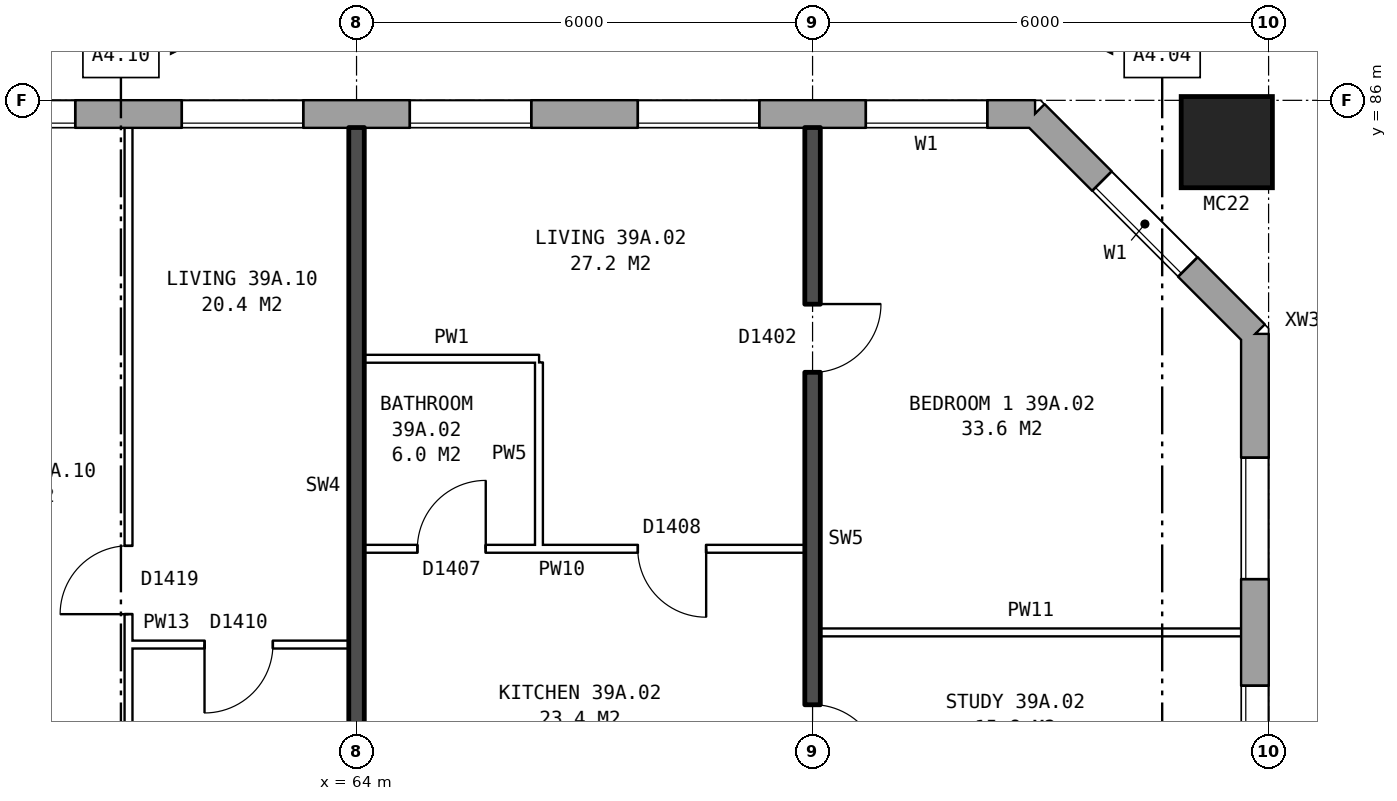
"""IFC4 building model, lengths in metres.
Left out: names, types, materials, properties, quantities, classifications, styles, units other than length and angle.
Written with IfcOpenShell. Run it as: python <this file> out.ifc"""

import sys

from ifc_helpers import new_model, si_unit, direction, frame, frame_2d, origin, origin_2d, place, context, subcontext, project, spatial, rectangle, hollow_rectangle, extrude, element, fill, save


model = new_model("IFC4")
c1 = context("Model", 3, precision=1e-05, world=origin(), true_north=direction((0.0, 1.0)))
c2 = subcontext(c1, "Body", "Model", "MODEL_VIEW")
j1 = project(units=[si_unit("LENGTHUNIT", "METRE"), si_unit("PLANEANGLEUNIT", "RADIAN")], contexts=[c1])
p1 = place(None, origin())
s1 = spatial("IfcSite", under=j1, at=p1, CompositionType="ELEMENT")
p2 = place(p1, origin())
s2 = spatial("IfcBuilding", under=s1, at=p2, CompositionType="ELEMENT")
p3 = place(p2, frame((0.0, 0.0, 139.2)))
s3 = spatial("IfcBuildingStorey", under=s2, at=p3, CompositionType="ELEMENT", Elevation=139.2)
p4 = place(p3, frame((75.45, 85.45, 0.0), z_axis=(0.0, 0.0, 1.0), x_axis=(1.0, 0.0, 0.0)))
e1 = element("IfcColumn", 1, at=p4, inside=s3, PredefinedType="COLUMN", context=c2, shape_type="SweptSolid", body=[
    extrude(hollow_rectangle(XDim=1.2, YDim=1.2, WallThickness=0.065, at=origin_2d()), origin(), (0.0, 0.0, 1.0), 3.1),
])
p5 = place(p3, frame((75.82, 57.075, 0.0), z_axis=(0.0, 0.0, 1.0), x_axis=(0.0, 1.0, 0.0)))
e2 = element("IfcWall", 2, at=p5, inside=s3, PredefinedType="STANDARD", context=c2, shape_type="SweptSolid", body=[
    extrude(rectangle(XDim=25.851, YDim=0.36, at=frame_2d((12.925, 0.0))), origin(), (0.0, 0.0, 1.0), 2.85),
])
p6 = place(p5, frame((1.625, 0.0, 0.8)))
e3 = element("IfcOpeningElement", 3, at=p6, cuts=e2, PredefinedType="OPENING", context=c2, shape_type="SweptSolid", body=[
    extrude(rectangle(XDim=1.6, YDim=1.8, at=frame_2d((0.8, 0.9))), frame((0.0, 0.19, 0.0), z_axis=(0.0, -1.0, 0.0), x_axis=(1.0, 0.0, 0.0)), (0.0, 0.0, 1.0), 0.38),
])
p7 = place(p5, frame((4.625, 0.0, 0.8)))
e4 = element("IfcOpeningElement", 4, at=p7, cuts=e2, PredefinedType="OPENING", context=c2, shape_type="SweptSolid", body=[
    extrude(rectangle(XDim=1.6, YDim=1.8, at=frame_2d((0.8, 0.9))), frame((0.0, 0.19, 0.0), z_axis=(0.0, -1.0, 0.0), x_axis=(1.0, 0.0, 0.0)), (0.0, 0.0, 1.0), 0.38),
])
p8 = place(p5, frame((19.625, 0.0, 0.8)))
e5 = element("IfcOpeningElement", 5, at=p8, cuts=e2, PredefinedType="OPENING", context=c2, shape_type="SweptSolid", body=[
    extrude(rectangle(XDim=1.6, YDim=1.8, at=frame_2d((0.8, 0.9))), frame((0.0, 0.19, 0.0), z_axis=(0.0, -1.0, 0.0), x_axis=(1.0, 0.0, 0.0)), (0.0, 0.0, 1.0), 0.38),
])
p9 = place(p5, frame((22.625, 0.0, 0.8)))
e6 = element("IfcOpeningElement", 6, at=p9, cuts=e2, PredefinedType="OPENING", context=c2, shape_type="SweptSolid", body=[
    extrude(rectangle(XDim=1.6, YDim=1.8, at=frame_2d((0.8, 0.9))), frame((0.0, 0.19, 0.0), z_axis=(0.0, -1.0, 0.0), x_axis=(1.0, 0.0, 0.0)), (0.0, 0.0, 1.0), 0.38),
])
p10 = place(p3, frame((75.82, 82.925, 0.0), z_axis=(0.0, 0.0, 1.0), x_axis=(-0.707106781187, 0.707106781187, 0.0)))
e7 = element("IfcWall", 7, at=p10, inside=s3, PredefinedType="STANDARD", context=c2, shape_type="SweptSolid", body=[
    extrude(rectangle(XDim=4.094, YDim=0.36, at=frame_2d((2.047, 0.0))), origin(), (0.0, 0.0, 1.0), 2.85),
])
p11 = place(p10, frame((1.247, 0.0, 0.8)))
e8 = element("IfcOpeningElement", 8, at=p11, cuts=e7, PredefinedType="OPENING", context=c2, shape_type="SweptSolid", body=[
    extrude(rectangle(XDim=1.6, YDim=1.8, at=frame_2d((0.8, 0.9))), frame((0.0, 0.19, 0.0), z_axis=(0.0, -1.0, 0.0), x_axis=(1.0, 0.0, 0.0)), (0.0, 0.0, 1.0), 0.38),
])
p12 = place(p3, frame((72.925, 85.82, 0.0), z_axis=(0.0, 0.0, 1.0), x_axis=(-1.0, 0.0, 0.0)))
e9 = element("IfcWall", 9, at=p12, inside=s3, PredefinedType="STANDARD", context=c2, shape_type="SweptSolid", body=[
    extrude(rectangle(XDim=43.101, YDim=0.36, at=frame_2d((21.55, 0.0))), origin(), (0.0, 0.0, 1.0), 2.85),
])
p13 = place(p12, frame((0.625, 0.0, 0.8)))
e10 = element("IfcOpeningElement", 10, at=p13, cuts=e9, PredefinedType="OPENING", context=c2, shape_type="SweptSolid", body=[
    extrude(rectangle(XDim=1.6, YDim=1.8, at=frame_2d((0.8, 0.9))), frame((0.0, 0.19, 0.0), z_axis=(0.0, -1.0, 0.0), x_axis=(1.0, 0.0, 0.0)), (0.0, 0.0, 1.0), 0.38),
])
p14 = place(p12, frame((3.625, 0.0, 0.8)))
e11 = element("IfcOpeningElement", 11, at=p14, cuts=e9, PredefinedType="OPENING", context=c2, shape_type="SweptSolid", body=[
    extrude(rectangle(XDim=1.6, YDim=1.8, at=frame_2d((0.8, 0.9))), frame((0.0, 0.19, 0.0), z_axis=(0.0, -1.0, 0.0), x_axis=(1.0, 0.0, 0.0)), (0.0, 0.0, 1.0), 0.38),
])
p15 = place(p12, frame((6.625, 0.0, 0.8)))
e12 = element("IfcOpeningElement", 12, at=p15, cuts=e9, PredefinedType="OPENING", context=c2, shape_type="SweptSolid", body=[
    extrude(rectangle(XDim=1.6, YDim=1.8, at=frame_2d((0.8, 0.9))), frame((0.0, 0.19, 0.0), z_axis=(0.0, -1.0, 0.0), x_axis=(1.0, 0.0, 0.0)), (0.0, 0.0, 1.0), 0.38),
])
p16 = place(p12, frame((9.625, 0.0, 0.8)))
e13 = element("IfcOpeningElement", 13, at=p16, cuts=e9, PredefinedType="OPENING", context=c2, shape_type="SweptSolid", body=[
    extrude(rectangle(XDim=1.6, YDim=1.8, at=frame_2d((0.8, 0.9))), frame((0.0, 0.19, 0.0), z_axis=(0.0, -1.0, 0.0), x_axis=(1.0, 0.0, 0.0)), (0.0, 0.0, 1.0), 0.38),
])
p17 = place(p12, frame((12.625, 0.0, 0.8)))
e14 = element("IfcOpeningElement", 14, at=p17, cuts=e9, PredefinedType="OPENING", context=c2, shape_type="SweptSolid", body=[
    extrude(rectangle(XDim=1.6, YDim=1.8, at=frame_2d((0.8, 0.9))), frame((0.0, 0.19, 0.0), z_axis=(0.0, -1.0, 0.0), x_axis=(1.0, 0.0, 0.0)), (0.0, 0.0, 1.0), 0.38),
])
p18 = place(p12, frame((15.625, 0.0, 0.8)))
e15 = element("IfcOpeningElement", 15, at=p18, cuts=e9, PredefinedType="OPENING", context=c2, shape_type="SweptSolid", body=[
    extrude(rectangle(XDim=1.6, YDim=1.8, at=frame_2d((0.8, 0.9))), frame((0.0, 0.19, 0.0), z_axis=(0.0, -1.0, 0.0), x_axis=(1.0, 0.0, 0.0)), (0.0, 0.0, 1.0), 0.38),
])
p19 = place(p12, frame((18.075, 0.0, 0.8)))
e16 = element("IfcOpeningElement", 16, at=p19, cuts=e9, PredefinedType="OPENING", context=c2, shape_type="SweptSolid", body=[
    extrude(rectangle(XDim=0.8, YDim=1.8, at=frame_2d((0.4, 0.9))), frame((0.0, 0.19, 0.0), z_axis=(0.0, -1.0, 0.0), x_axis=(1.0, 0.0, 0.0)), (0.0, 0.0, 1.0), 0.38),
])
p20 = place(p12, frame((21.125, 0.0, 0.15)))
e17 = element("IfcOpeningElement", 17, at=p20, cuts=e9, PredefinedType="OPENING", context=c2, shape_type="SweptSolid", body=[
    extrude(rectangle(XDim=1.0, YDim=1.5, at=frame_2d((0.5, 0.75))), frame((0.0, 0.19, 0.0), z_axis=(0.0, -1.0, 0.0), x_axis=(1.0, 0.0, 0.0)), (0.0, 0.0, 1.0), 0.38),
])
p21 = place(p12, frame((24.625, 0.0, 0.8)))
e18 = element("IfcOpeningElement", 18, at=p21, cuts=e9, PredefinedType="OPENING", context=c2, shape_type="SweptSolid", body=[
    extrude(rectangle(XDim=1.6, YDim=1.8, at=frame_2d((0.8, 0.9))), frame((0.0, 0.19, 0.0), z_axis=(0.0, -1.0, 0.0), x_axis=(1.0, 0.0, 0.0)), (0.0, 0.0, 1.0), 0.38),
])
p22 = place(p12, frame((27.625, 0.0, 0.8)))
e19 = element("IfcOpeningElement", 19, at=p22, cuts=e9, PredefinedType="OPENING", context=c2, shape_type="SweptSolid", body=[
    extrude(rectangle(XDim=1.6, YDim=1.8, at=frame_2d((0.8, 0.9))), frame((0.0, 0.19, 0.0), z_axis=(0.0, -1.0, 0.0), x_axis=(1.0, 0.0, 0.0)), (0.0, 0.0, 1.0), 0.38),
])
p23 = place(p12, frame((30.625, 0.0, 0.8)))
e20 = element("IfcOpeningElement", 20, at=p23, cuts=e9, PredefinedType="OPENING", context=c2, shape_type="SweptSolid", body=[
    extrude(rectangle(XDim=1.6, YDim=1.8, at=frame_2d((0.8, 0.9))), frame((0.0, 0.19, 0.0), z_axis=(0.0, -1.0, 0.0), x_axis=(1.0, 0.0, 0.0)), (0.0, 0.0, 1.0), 0.38),
])
p24 = place(p12, frame((33.625, 0.0, 0.8)))
e21 = element("IfcOpeningElement", 21, at=p24, cuts=e9, PredefinedType="OPENING", context=c2, shape_type="SweptSolid", body=[
    extrude(rectangle(XDim=1.6, YDim=1.8, at=frame_2d((0.8, 0.9))), frame((0.0, 0.19, 0.0), z_axis=(0.0, -1.0, 0.0), x_axis=(1.0, 0.0, 0.0)), (0.0, 0.0, 1.0), 0.38),
])
p25 = place(p12, frame((36.625, 0.0, 0.8)))
e22 = element("IfcOpeningElement", 22, at=p25, cuts=e9, PredefinedType="OPENING", context=c2, shape_type="SweptSolid", body=[
    extrude(rectangle(XDim=1.6, YDim=1.8, at=frame_2d((0.8, 0.9))), frame((0.0, 0.19, 0.0), z_axis=(0.0, -1.0, 0.0), x_axis=(1.0, 0.0, 0.0)), (0.0, 0.0, 1.0), 0.38),
])
p26 = place(p12, frame((39.625, 0.0, 0.8)))
e23 = element("IfcOpeningElement", 23, at=p26, cuts=e9, PredefinedType="OPENING", context=c2, shape_type="SweptSolid", body=[
    extrude(rectangle(XDim=1.6, YDim=1.8, at=frame_2d((0.8, 0.9))), frame((0.0, 0.19, 0.0), z_axis=(0.0, -1.0, 0.0), x_axis=(1.0, 0.0, 0.0)), (0.0, 0.0, 1.0), 0.38),
])
p27 = place(p12, frame((19.175, 0.0, 1.6)))
e24 = element("IfcOpeningElement", 24, at=p27, cuts=e9, PredefinedType="OPENING", context=c2, shape_type="SweptSolid", body=[
    extrude(rectangle(XDim=0.6, YDim=0.9, at=frame_2d((0.3, 0.45))), frame((0.0, 0.19, 0.0), z_axis=(0.0, -1.0, 0.0), x_axis=(1.0, 0.0, 0.0)), (0.0, 0.0, 1.0), 0.38),
])
p28 = place(p3, frame((61.0, 78.84, 0.0), z_axis=(0.0, 0.0, 1.0), x_axis=(1.0, 0.0, 0.0)))
e25 = element("IfcWall", 25, at=p28, inside=s3, PredefinedType="PARTITIONING", context=c2, shape_type="SweptSolid", body=[
    extrude(rectangle(XDim=2.9, YDim=0.1, at=frame_2d((1.45, 0.0))), origin(), (0.0, 0.0, 1.0), 2.85),
])
p29 = place(p28, frame((1.0, 0.0, 0.0)))
e26 = element("IfcOpeningElement", 26, at=p29, cuts=e25, PredefinedType="OPENING", context=c2, shape_type="SweptSolid", body=[
    extrude(rectangle(XDim=0.9, YDim=2.1, at=frame_2d((0.45, 1.05))), frame((0.0, 0.06, 0.0), z_axis=(0.0, -1.0, 0.0), x_axis=(1.0, 0.0, 0.0)), (0.0, 0.0, 1.0), 0.12),
])
p30 = place(p3, frame((70.1, 79.0, 0.0), z_axis=(0.0, 0.0, 1.0), x_axis=(1.0, 0.0, 0.0)))
e27 = element("IfcWall", 27, at=p30, inside=s3, PredefinedType="PARTITIONING", context=c2, shape_type="SweptSolid", body=[
    extrude(rectangle(XDim=5.54, YDim=0.1, at=frame_2d((2.77, 0.0))), origin(), (0.0, 0.0, 1.0), 2.85),
])
p31 = place(p3, frame((64.1, 80.1, 0.0), z_axis=(0.0, 0.0, 1.0), x_axis=(1.0, 0.0, 0.0)))
e28 = element("IfcWall", 28, at=p31, inside=s3, PredefinedType="PARTITIONING", context=c2, shape_type="SweptSolid", body=[
    extrude(rectangle(XDim=5.8, YDim=0.1, at=frame_2d((2.9, 0.0))), origin(), (0.0, 0.0, 1.0), 2.85),
])
p32 = place(p31, frame((3.6, 0.0, 0.0)))
e29 = element("IfcOpeningElement", 29, at=p32, cuts=e28, PredefinedType="OPENING", context=c2, shape_type="SweptSolid", body=[
    extrude(rectangle(XDim=0.9, YDim=2.1, at=frame_2d((0.45, 1.05))), frame((0.0, 0.06, 0.0), z_axis=(0.0, -1.0, 0.0), x_axis=(1.0, 0.0, 0.0)), (0.0, 0.0, 1.0), 0.12),
])
p33 = place(p31, frame((0.7, 0.0, 0.0)))
e30 = element("IfcOpeningElement", 30, at=p33, cuts=e28, PredefinedType="OPENING", context=c2, shape_type="SweptSolid", body=[
    extrude(rectangle(XDim=0.9, YDim=2.1, at=frame_2d((0.45, 1.05))), frame((0.0, 0.06, 0.0), z_axis=(0.0, -1.0, 0.0), x_axis=(1.0, 0.0, 0.0)), (0.0, 0.0, 1.0), 0.12),
])
p34 = place(p3, frame((64.1, 82.6, 0.0), z_axis=(0.0, 0.0, 1.0), x_axis=(1.0, 0.0, 0.0)))
e31 = element("IfcWall", 31, at=p34, inside=s3, PredefinedType="PARTITIONING", context=c2, shape_type="SweptSolid", body=[
    extrude(rectangle(XDim=2.3, YDim=0.1, at=frame_2d((1.15, 0.0))), origin(), (0.0, 0.0, 1.0), 2.85),
])
p35 = place(p3, frame((61.0, 71.3, 0.0), z_axis=(0.0, 0.0, 1.0), x_axis=(0.0, 1.0, 0.0)))
e32 = element("IfcWall", 32, at=p35, inside=s3, PredefinedType="PARTITIONING", context=c2, shape_type="SweptSolid", body=[
    extrude(rectangle(XDim=14.34, YDim=0.1, at=frame_2d((7.17, 0.0))), origin(), (0.0, 0.0, 1.0), 2.85),
])
p36 = place(p35, frame((7.94, 0.0, 0.0)))
e33 = element("IfcOpeningElement", 33, at=p36, cuts=e32, PredefinedType="OPENING", context=c2, shape_type="SweptSolid", body=[
    extrude(rectangle(XDim=0.9, YDim=2.1, at=frame_2d((0.45, 1.05))), frame((0.0, 0.06, 0.0), z_axis=(0.0, -1.0, 0.0), x_axis=(1.0, 0.0, 0.0)), (0.0, 0.0, 1.0), 0.12),
])
p37 = place(p35, frame((0.9, 0.0, 0.0)))
e34 = element("IfcOpeningElement", 34, at=p37, cuts=e32, PredefinedType="OPENING", context=c2, shape_type="SweptSolid", body=[
    extrude(rectangle(XDim=0.9, YDim=2.1, at=frame_2d((0.45, 1.05))), frame((0.0, 0.06, 0.0), z_axis=(0.0, -1.0, 0.0), x_axis=(1.0, 0.0, 0.0)), (0.0, 0.0, 1.0), 0.12),
])
p38 = place(p3, frame((64.0, 76.2, 0.0), z_axis=(0.0, 0.0, 1.0), x_axis=(0.0, 1.0, 0.0)))
e35 = element("IfcWall", 35, at=p38, inside=s3, PredefinedType="SOLIDWALL", context=c2, shape_type="SweptSolid", body=[
    extrude(rectangle(XDim=9.44, YDim=0.2, at=frame_2d((4.72, 0.0))), origin(), (0.0, 0.0, 1.0), 2.85),
])
p39 = place(p3, frame((66.4, 80.15, 0.0), z_axis=(0.0, 0.0, 1.0), x_axis=(0.0, 1.0, 0.0)))
e36 = element("IfcWall", 36, at=p39, inside=s3, PredefinedType="PARTITIONING", context=c2, shape_type="SweptSolid", body=[
    extrude(rectangle(XDim=2.4, YDim=0.1, at=frame_2d((1.2, 0.0))), origin(), (0.0, 0.0, 1.0), 2.85),
])
p40 = place(p3, frame((70.0, 76.2, 0.0), z_axis=(0.0, 0.0, 1.0), x_axis=(0.0, 1.0, 0.0)))
e37 = element("IfcWall", 37, at=p40, inside=s3, PredefinedType="SOLIDWALL", context=c2, shape_type="SweptSolid", body=[
    extrude(rectangle(XDim=9.44, YDim=0.2, at=frame_2d((4.72, 0.0))), origin(), (0.0, 0.0, 1.0), 2.85),
])
p41 = place(p40, frame((6.22, 0.0, 0.0)))
e38 = element("IfcOpeningElement", 38, at=p41, cuts=e37, PredefinedType="OPENING", context=c2, shape_type="SweptSolid", body=[
    extrude(rectangle(XDim=0.9, YDim=2.1, at=frame_2d((0.45, 1.05))), frame((0.0, 0.11, 0.0), z_axis=(0.0, -1.0, 0.0), x_axis=(1.0, 0.0, 0.0)), (0.0, 0.0, 1.0), 0.22),
])
p42 = place(p40, frame((0.95, 0.0, 0.0)))
e39 = element("IfcOpeningElement", 39, at=p42, cuts=e37, PredefinedType="OPENING", context=c2, shape_type="SweptSolid", body=[
    extrude(rectangle(XDim=0.9, YDim=2.1, at=frame_2d((0.45, 1.05))), frame((0.0, 0.11, 0.0), z_axis=(0.0, -1.0, 0.0), x_axis=(1.0, 0.0, 0.0)), (0.0, 0.0, 1.0), 0.22),
])
p43 = place(p8, origin())
e40 = element("IfcWindow", 40, at=p43, inside=s3, PartitioningType="SINGLE_PANEL", PredefinedType="WINDOW", context=c2, shape_type="SweptSolid", body=[
    extrude(rectangle(XDim=1.6, YDim=1.8, at=frame_2d((0.8, 0.9))), frame((0.0, 0.15, 0.0), z_axis=(0.0, -1.0, 0.0), x_axis=(1.0, 0.0, 0.0)), (0.0, 0.0, 1.0), 0.06),
])
fill(e5, e40)
p44 = place(p9, origin())
e41 = element("IfcWindow", 41, at=p44, inside=s3, PartitioningType="SINGLE_PANEL", PredefinedType="WINDOW", context=c2, shape_type="SweptSolid", body=[
    extrude(rectangle(XDim=1.6, YDim=1.8, at=frame_2d((0.8, 0.9))), frame((0.0, 0.15, 0.0), z_axis=(0.0, -1.0, 0.0), x_axis=(1.0, 0.0, 0.0)), (0.0, 0.0, 1.0), 0.06),
])
fill(e6, e41)
p45 = place(p11, origin())
e42 = element("IfcWindow", 42, at=p45, inside=s3, PartitioningType="SINGLE_PANEL", PredefinedType="WINDOW", context=c2, shape_type="SweptSolid", body=[
    extrude(rectangle(XDim=1.6, YDim=1.8, at=frame_2d((0.8, 0.9))), frame((0.0, 0.15, 0.0), z_axis=(0.0, -1.0, 0.0), x_axis=(1.0, 0.0, 0.0)), (0.0, 0.0, 1.0), 0.06),
])
fill(e8, e42)
p46 = place(p13, origin())
e43 = element("IfcWindow", 43, at=p46, inside=s3, PartitioningType="SINGLE_PANEL", PredefinedType="WINDOW", context=c2, shape_type="SweptSolid", body=[
    extrude(rectangle(XDim=1.6, YDim=1.8, at=frame_2d((0.8, 0.9))), frame((0.0, 0.15, 0.0), z_axis=(0.0, -1.0, 0.0), x_axis=(1.0, 0.0, 0.0)), (0.0, 0.0, 1.0), 0.06),
])
fill(e10, e43)
p47 = place(p14, origin())
e44 = element("IfcWindow", 44, at=p47, inside=s3, PartitioningType="SINGLE_PANEL", PredefinedType="WINDOW", context=c2, shape_type="SweptSolid", body=[
    extrude(rectangle(XDim=1.6, YDim=1.8, at=frame_2d((0.8, 0.9))), frame((0.0, 0.15, 0.0), z_axis=(0.0, -1.0, 0.0), x_axis=(1.0, 0.0, 0.0)), (0.0, 0.0, 1.0), 0.06),
])
fill(e11, e44)
p48 = place(p15, origin())
e45 = element("IfcWindow", 45, at=p48, inside=s3, PartitioningType="SINGLE_PANEL", PredefinedType="WINDOW", context=c2, shape_type="SweptSolid", body=[
    extrude(rectangle(XDim=1.6, YDim=1.8, at=frame_2d((0.8, 0.9))), frame((0.0, 0.15, 0.0), z_axis=(0.0, -1.0, 0.0), x_axis=(1.0, 0.0, 0.0)), (0.0, 0.0, 1.0), 0.06),
])
fill(e12, e45)
p49 = place(p16, origin())
e46 = element("IfcWindow", 46, at=p49, inside=s3, PartitioningType="SINGLE_PANEL", PredefinedType="WINDOW", context=c2, shape_type="SweptSolid", body=[
    extrude(rectangle(XDim=1.6, YDim=1.8, at=frame_2d((0.8, 0.9))), frame((0.0, 0.15, 0.0), z_axis=(0.0, -1.0, 0.0), x_axis=(1.0, 0.0, 0.0)), (0.0, 0.0, 1.0), 0.06),
])
fill(e13, e46)
p50 = place(p17, origin())
e47 = element("IfcWindow", 47, at=p50, inside=s3, PartitioningType="SINGLE_PANEL", PredefinedType="WINDOW", context=c2, shape_type="SweptSolid", body=[
    extrude(rectangle(XDim=1.6, YDim=1.8, at=frame_2d((0.8, 0.9))), frame((0.0, 0.15, 0.0), z_axis=(0.0, -1.0, 0.0), x_axis=(1.0, 0.0, 0.0)), (0.0, 0.0, 1.0), 0.06),
])
fill(e14, e47)
p51 = place(p41, frame((0.9, 0.0, 0.0), z_axis=(0.0, 0.0, 1.0), x_axis=(-1.0, 0.0, 0.0)))
e48 = element("IfcDoor", 48, at=p51, inside=s3, OperationType="SINGLE_SWING_LEFT", PredefinedType="DOOR", context=c2, shape_type="SweptSolid", body=[
    extrude(rectangle(XDim=0.9, YDim=2.1, at=frame_2d((0.45, 1.05))), frame((0.0, 0.025, 0.0), z_axis=(0.0, -1.0, 0.0), x_axis=(1.0, 0.0, 0.0)), (0.0, 0.0, 1.0), 0.05),
])
fill(e38, e48)
p52 = place(p42, frame((0.9, 0.0, 0.0), z_axis=(0.0, 0.0, 1.0), x_axis=(-1.0, 0.0, 0.0)))
e49 = element("IfcDoor", 49, at=p52, inside=s3, OperationType="SINGLE_SWING_RIGHT", PredefinedType="DOOR", context=c2, shape_type="SweptSolid", body=[
    extrude(rectangle(XDim=0.9, YDim=2.1, at=frame_2d((0.45, 1.05))), frame((0.0, 0.025, 0.0), z_axis=(0.0, -1.0, 0.0), x_axis=(1.0, 0.0, 0.0)), (0.0, 0.0, 1.0), 0.05),
])
fill(e39, e49)
p53 = place(p32, frame((0.9, 0.0, 0.0), z_axis=(0.0, 0.0, 1.0), x_axis=(-1.0, 0.0, 0.0)))
e50 = element("IfcDoor", 50, at=p53, inside=s3, OperationType="SINGLE_SWING_LEFT", PredefinedType="DOOR", context=c2, shape_type="SweptSolid", body=[
    extrude(rectangle(XDim=0.9, YDim=2.1, at=frame_2d((0.45, 1.05))), frame((0.0, 0.025, 0.0), z_axis=(0.0, -1.0, 0.0), x_axis=(1.0, 0.0, 0.0)), (0.0, 0.0, 1.0), 0.05),
])
fill(e29, e50)
p54 = place(p33, origin())
e51 = element("IfcDoor", 51, at=p54, inside=s3, OperationType="SINGLE_SWING_RIGHT", PredefinedType="DOOR", context=c2, shape_type="SweptSolid", body=[
    extrude(rectangle(XDim=0.9, YDim=2.1, at=frame_2d((0.45, 1.05))), frame((0.0, 0.025, 0.0), z_axis=(0.0, -1.0, 0.0), x_axis=(1.0, 0.0, 0.0)), (0.0, 0.0, 1.0), 0.05),
])
fill(e30, e51)
p55 = place(p36, origin())
e52 = element("IfcDoor", 52, at=p55, inside=s3, OperationType="SINGLE_SWING_LEFT", PredefinedType="DOOR", context=c2, shape_type="SweptSolid", body=[
    extrude(rectangle(XDim=0.9, YDim=2.1, at=frame_2d((0.45, 1.05))), frame((0.0, 0.025, 0.0), z_axis=(0.0, -1.0, 0.0), x_axis=(1.0, 0.0, 0.0)), (0.0, 0.0, 1.0), 0.05),
])
fill(e33, e52)
p56 = place(p29, frame((0.9, 0.0, 0.0), z_axis=(0.0, 0.0, 1.0), x_axis=(-1.0, 0.0, 0.0)))
e53 = element("IfcDoor", 53, at=p56, inside=s3, OperationType="SINGLE_SWING_RIGHT", PredefinedType="DOOR", context=c2, shape_type="SweptSolid", body=[
    extrude(rectangle(XDim=0.9, YDim=2.1, at=frame_2d((0.45, 1.05))), frame((0.0, 0.025, 0.0), z_axis=(0.0, -1.0, 0.0), x_axis=(1.0, 0.0, 0.0)), (0.0, 0.0, 1.0), 0.05),
])
fill(e26, e53)
save(model, sys.argv[1])
